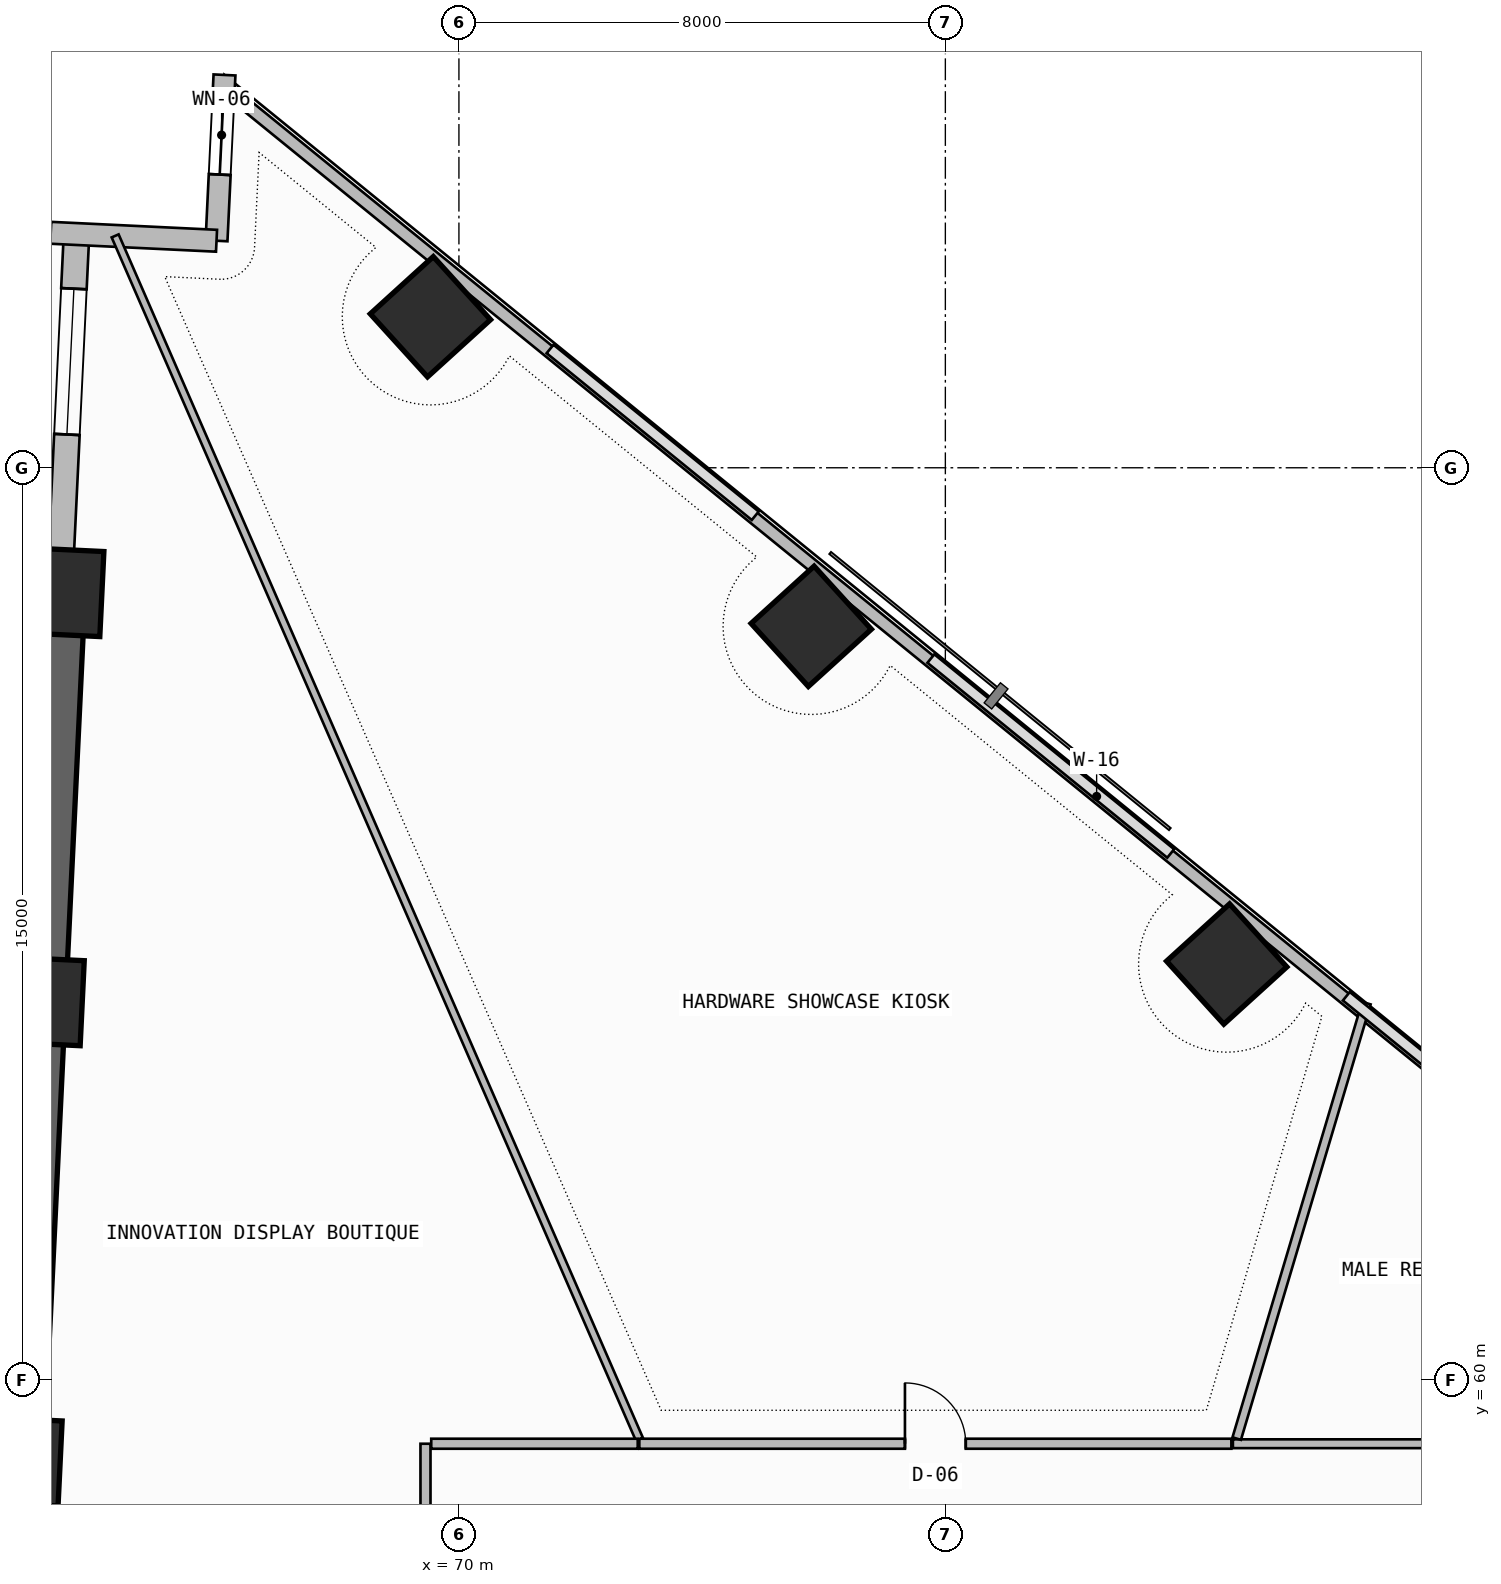
"""IFC4 building model, lengths in metres.
Left out: names, types, materials, properties, quantities, classifications, styles, units other than length and angle.
Written with IfcOpenShell. Run it as: python <this file> out.ifc"""

import sys

from ifc_helpers import new_model, si_unit, direction, frame, frame_2d, origin, origin_2d, place, context, subcontext, project, spatial, rectangle, extrude, element, fill, save


model = new_model("IFC4")
c1 = context("Model", 3, precision=1e-05, world=origin(), true_north=direction((0.0, 1.0)))
c2 = subcontext(c1, "Body", "Model", "MODEL_VIEW")
j1 = project(units=[si_unit("LENGTHUNIT", "METRE"), si_unit("PLANEANGLEUNIT", "RADIAN")], contexts=[c1])
p1 = place(None, origin())
s1 = spatial("IfcSite", under=j1, at=p1, CompositionType="ELEMENT")
p2 = place(p1, origin())
s2 = spatial("IfcBuilding", under=s1, at=p2, CompositionType="ELEMENT")
p3 = place(p2, frame((0.0, 0.0, 48.3)))
s3 = spatial("IfcBuildingStorey", under=s2, at=p3, CompositionType="ELEMENT", Elevation=48.3)
for number, where, z_axis, x_axis in (
    (1, (82.627, 66.839, 0.0), (0.0, 0.0, 1.0), (0.74, 0.672, 0.0)),
    (2, (75.794, 72.392, 0.0), (0.0, 0.0, 1.0), (0.74, 0.672, 0.0)),
    (3, (69.531, 77.483, 0.0), (0.0, 0.0, 1.0), (0.74, 0.672, 0.0)),
    (4, (63.428, 72.957, 0.0), (0.0, 0.0, 1.0), (0.048, 0.999, 0.0)),
    (5, (63.105, 66.228, 0.0), (0.0, 0.0, 1.0), (0.048, 0.999, 0.0)),
    (6, (62.742, 58.659, 0.0), (0.0, 0.0, 1.0), (0.048, 0.999, 0.0)),
):
    element("IfcColumn", number, at=place(p3, frame(where, z_axis=z_axis, x_axis=x_axis)), inside=s3, PredefinedType="COLUMN", context=c2, shape_type="SweptSolid", body=[
        extrude(rectangle(XDim=1.4, YDim=1.4, at=origin_2d()), origin(), (0.0, 0.0, 1.0), 3.6),
    ])
p4 = place(p3, frame((63.711, 78.844, 0.0), z_axis=(0.0, 0.0, 1.0), x_axis=(-0.048007946398, -0.998846953784, 0.0)))
e7 = element("IfcWall", 7, at=p4, inside=s3, PredefinedType="SOLIDWALL", context=c2, shape_type="SweptSolid", body=[
    extrude(rectangle(XDim=5.894, YDim=0.42, at=frame_2d((2.947, 0.0))), origin(), (0.0, 0.0, 1.0), 2.385),
])
p5 = place(p4, frame((0.9, 0.0, 1.2)))
e8 = element("IfcOpeningElement", 8, at=p5, cuts=e7, PredefinedType="OPENING", context=c2, shape_type="SweptSolid", body=[
    extrude(rectangle(XDim=2.4, YDim=0.9, at=frame_2d((1.2, 0.45))), frame((0.0, 0.22, 0.0), z_axis=(0.0, -1.0, 0.0), x_axis=(1.0, 0.0, 0.0)), (0.0, 0.0, 1.0), 0.44),
])
p6 = place(p3, frame((63.428, 72.957, -0.26), z_axis=(0.0, 0.0, 1.0), x_axis=(-0.047976309476, -0.998848473858, 0.0)))
e9 = element("IfcWall", 9, at=p6, inside=s3, PredefinedType="SHEAR", context=c2, shape_type="SweptSolid", body=[
    extrude(rectangle(XDim=21.892, YDim=0.85, at=frame_2d((10.946, 0.0))), origin(), (0.0, 0.0, 1.0), 3.66),
])
p7 = place(p3, frame((66.144, 81.46, 0.0), z_axis=(0.0, 0.0, 1.0), x_axis=(-0.047934806162, -0.998850466465, 0.0)))
e10 = element("IfcWall", 10, at=p7, inside=s3, PredefinedType="SOLIDWALL", context=c2, shape_type="SweptSolid", body=[
    extrude(rectangle(XDim=2.73, YDim=0.36, at=frame_2d((1.365, 0.0))), origin(), (0.0, 0.0, 1.0), 3.4),
])
p8 = place(p7, frame((0.34, 0.0, 0.45)))
e11 = element("IfcOpeningElement", 11, at=p8, cuts=e10, PredefinedType="OPENING", context=c2, shape_type="SweptSolid", body=[
    extrude(rectangle(XDim=1.3, YDim=2.4, at=frame_2d((0.65, 1.2))), frame((0.0, 0.19, 0.0), z_axis=(0.0, -1.0, 0.0), x_axis=(1.0, 0.0, 0.0)), (0.0, 0.0, 1.0), 0.38),
])
p9 = place(p3, frame((66.013, 78.733, 0.0), z_axis=(0.0, 0.0, 1.0), x_axis=(-0.998846180588, 0.048024030708, 0.0)))
e12 = element("IfcWall", 12, at=p9, inside=s3, PredefinedType="SOLIDWALL", context=c2, shape_type="SweptSolid", body=[
    extrude(rectangle(XDim=2.73, YDim=0.36, at=frame_2d((1.365, 0.0))), origin(), (0.0, 0.0, 1.0), 3.4),
])
p10 = place(p3, frame((94.513, 58.196, 0.0), z_axis=(0.0, 0.0, 1.0), x_axis=(-0.776001602097, 0.630730935933, 0.0)))
e13 = element("IfcWall", 13, at=p10, inside=s3, PredefinedType="PARAPET", context=c2, shape_type="SweptSolid", body=[
    extrude(rectangle(XDim=36.148, YDim=0.2, at=frame_2d((18.074, 0.0))), origin(), (0.0, 0.0, 1.0), 1.15),
])
p11 = place(p3, frame((88.065, 58.95, 0.0), z_axis=(0.0, 0.0, 1.0), x_axis=(-1.0, 0.0, 0.0)))
e14 = element("IfcWall", 14, at=p11, inside=s3, PredefinedType="PARTITIONING", context=c2, shape_type="SweptSolid", body=[
    extrude(rectangle(XDim=5.336, YDim=0.145, at=frame_2d((2.668, 0.0))), origin(), (0.0, 0.0, 1.0), 2.785),
])
p12 = place(p3, frame((82.792, 59.034, 0.0), z_axis=(0.0, 0.0, 1.0), x_axis=(0.285401878516, 0.958407933888, 0.0)))
e15 = element("IfcWall", 15, at=p12, inside=s3, PredefinedType="PARTITIONING", context=c2, shape_type="SweptSolid", body=[
    extrude(rectangle(XDim=7.472, YDim=0.145, at=frame_2d((3.736, 0.0))), origin(), (0.0, 0.0, 1.0), 2.785),
])
p13 = place(p3, frame((82.704, 58.95, 0.0), z_axis=(0.0, 0.0, 1.0), x_axis=(-1.0, 0.0, 0.0)))
e16 = element("IfcWall", 16, at=p13, inside=s3, PredefinedType="PARTITIONING", context=c2, shape_type="SweptSolid", body=[
    extrude(rectangle(XDim=9.737, YDim=0.165, at=frame_2d((4.869, 0.0))), origin(), (0.0, 0.0, 1.0), 3.4),
])
p14 = place(p13, frame((4.369, 0.0, 0.0)))
e17 = element("IfcOpeningElement", 17, at=p14, cuts=e16, PredefinedType="OPENING", context=c2, shape_type="SweptSolid", body=[
    extrude(rectangle(XDim=1.0, YDim=2.2, at=frame_2d((0.5, 1.1))), frame((0.0, 0.093, 0.0), z_axis=(0.0, -1.0, 0.0), x_axis=(1.0, 0.0, 0.0)), (0.0, 0.0, 1.0), 0.185),
])
p15 = place(p3, frame((72.967, 59.028, 0.0), z_axis=(0.0, 0.0, 1.0), x_axis=(-0.399433319224, 0.916762250256, 0.0)))
e18 = element("IfcWall", 18, at=p15, inside=s3, PredefinedType="PARTITIONING", context=c2, shape_type="SweptSolid", body=[
    extrude(rectangle(XDim=21.582, YDim=0.125, at=frame_2d((10.791, 0.0))), origin(), (0.0, 0.0, 1.0), 2.785),
])
p16 = place(p3, frame((69.45, 58.95, 0.0), z_axis=(0.0, 0.0, 1.0), x_axis=(0.0, -1.0, 0.0)))
e19 = element("IfcWall", 19, at=p16, inside=s3, PredefinedType="PARTITIONING", context=c2, shape_type="SweptSolid", body=[
    extrude(rectangle(XDim=8.705, YDim=0.165, at=frame_2d((4.353, 0.0))), origin(), (0.0, 0.0, 1.0), 2.785),
])
p17 = place(p16, frame((3.853, 0.0, 0.0)))
e20 = element("IfcOpeningElement", 20, at=p17, cuts=e19, PredefinedType="OPENING", context=c2, shape_type="SweptSolid", body=[
    extrude(rectangle(XDim=1.0, YDim=2.2, at=frame_2d((0.5, 1.1))), frame((0.0, 0.093, 0.0), z_axis=(0.0, -1.0, 0.0), x_axis=(1.0, 0.0, 0.0)), (0.0, 0.0, 1.0), 0.185),
])
p18 = place(p3, frame((72.94, 58.95, 0.0), z_axis=(0.0, 0.0, 1.0), x_axis=(-1.0, 0.0, 0.0)))
e21 = element("IfcWall", 21, at=p18, inside=s3, PredefinedType="PARTITIONING", context=c2, shape_type="SweptSolid", body=[
    extrude(rectangle(XDim=3.396, YDim=0.165, at=frame_2d((1.698, 0.0))), origin(), (0.0, 0.0, 1.0), 2.785),
])
p19 = place(p5, origin())
e22 = element("IfcWindow", 22, at=p19, inside=s3, PartitioningType="SINGLE_PANEL", PredefinedType="WINDOW", context=c2, shape_type="SweptSolid", body=[
    extrude(rectangle(XDim=2.4, YDim=0.9, at=frame_2d((1.2, 0.45))), frame((0.0, 0.03, 0.0), z_axis=(0.0, -1.0, 0.0), x_axis=(1.0, 0.0, 0.0)), (0.0, 0.0, 1.0), 0.06),
])
fill(e8, e22)
p20 = place(p8, origin())
e23 = element("IfcWindow", 23, at=p20, inside=s3, PartitioningType="SINGLE_PANEL", PredefinedType="WINDOW", context=c2, shape_type="SweptSolid", body=[
    extrude(rectangle(XDim=1.3, YDim=2.4, at=frame_2d((0.65, 1.2))), frame((0.0, 0.03, 0.0), z_axis=(0.0, -1.0, 0.0), x_axis=(1.0, 0.0, 0.0)), (0.0, 0.0, 1.0), 0.06),
])
fill(e11, e23)
p21 = place(p14, frame((1.0, 0.0, 0.0), z_axis=(0.0, 0.0, 1.0), x_axis=(-1.0, 0.0, 0.0)))
e24 = element("IfcDoor", 24, at=p21, inside=s3, OperationType="SINGLE_SWING_LEFT", PredefinedType="DOOR", context=c2, shape_type="SweptSolid", body=[
    extrude(rectangle(XDim=1.0, YDim=2.2, at=frame_2d((0.5, 1.1))), frame((0.0, 0.025, 0.0), z_axis=(0.0, -1.0, 0.0), x_axis=(1.0, 0.0, 0.0)), (0.0, 0.0, 1.0), 0.05),
])
fill(e17, e24)
save(model, sys.argv[1])
